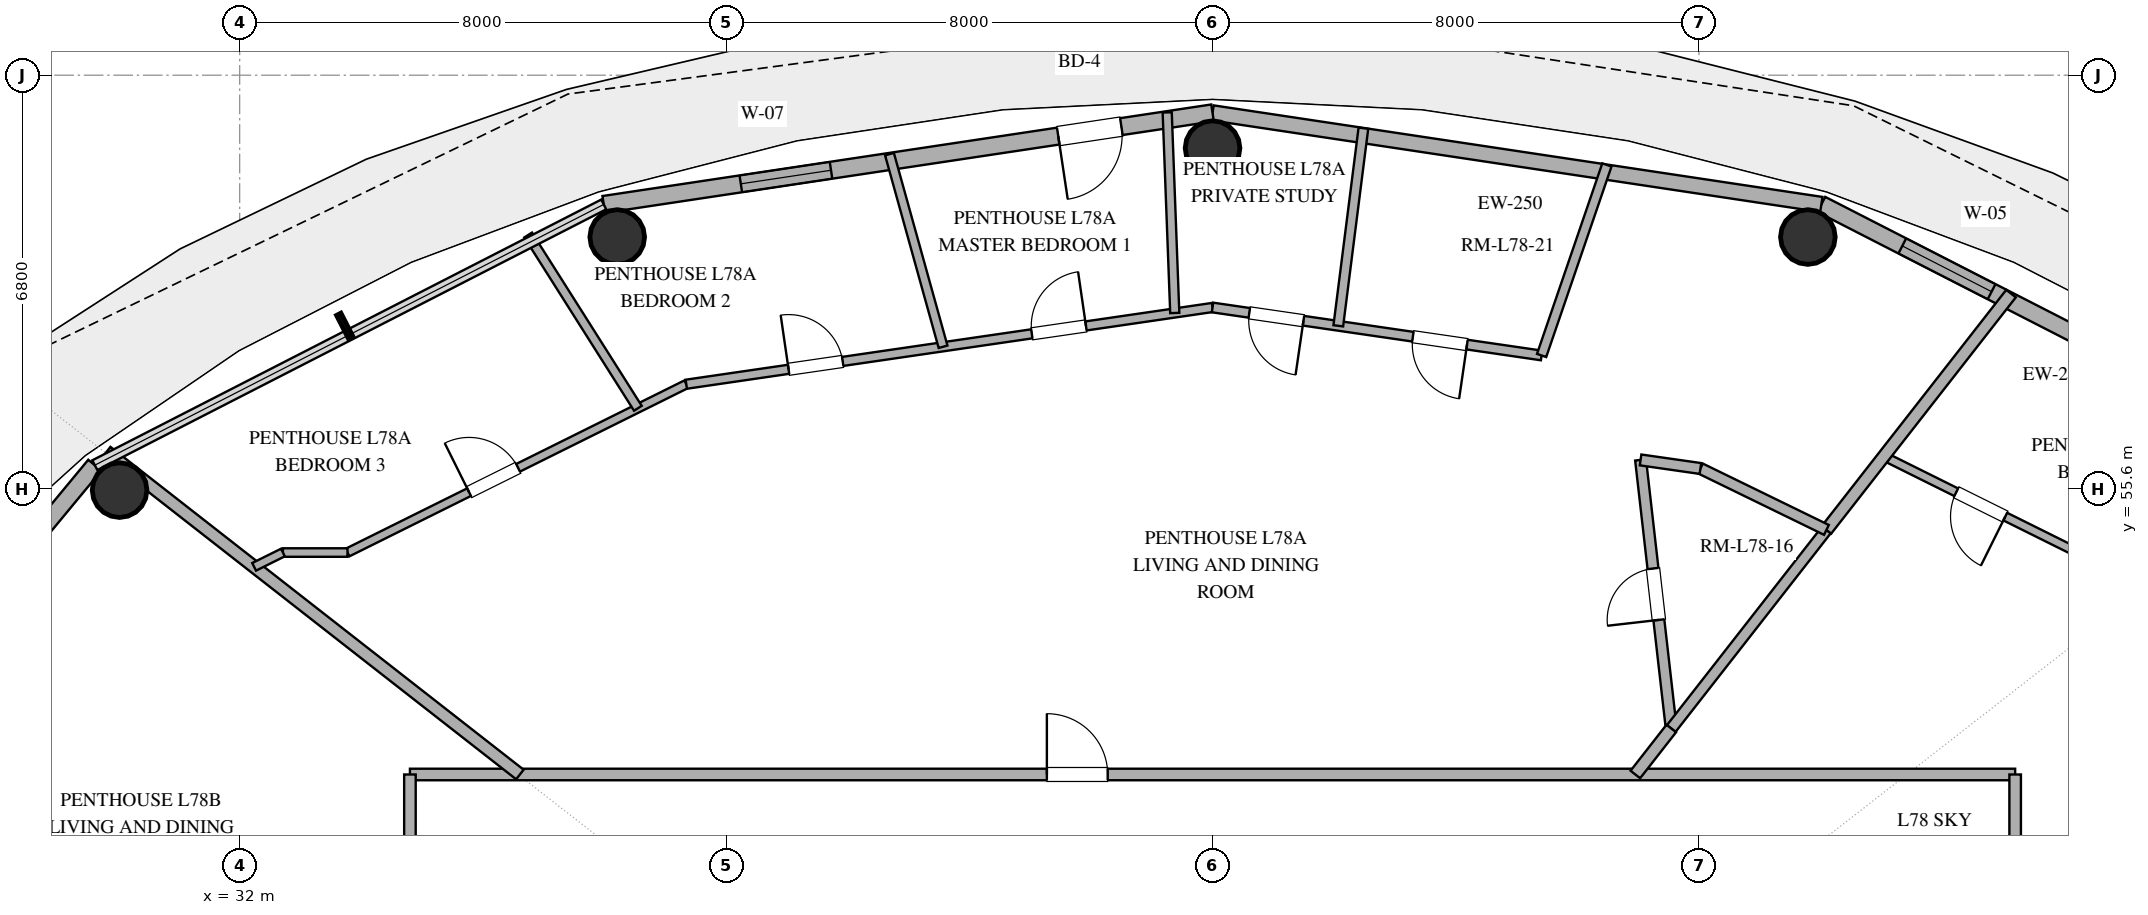
"""IFC4 building model, lengths in metres.
Left out: names, types, materials, properties, quantities, classifications, styles, units other than length and angle.
Written with IfcOpenShell. Run it as: python <this file> out.ifc"""

import sys

from ifc_helpers import new_model, si_unit, direction, frame, frame_2d, origin, origin_2d, place, context, subcontext, project, spatial, rectangle, hollow_circle, extrude, element, fill, save


model = new_model("IFC4")
c1 = context("Model", 3, precision=1e-05, world=origin(), true_north=direction((0.0, 1.0)))
c2 = subcontext(c1, "Body", "Model", "MODEL_VIEW")
j1 = project(units=[si_unit("LENGTHUNIT", "METRE"), si_unit("PLANEANGLEUNIT", "RADIAN")], contexts=[c1])
p1 = place(None, origin())
s1 = spatial("IfcSite", under=j1, at=p1, CompositionType="ELEMENT")
p2 = place(p1, origin())
s2 = spatial("IfcBuilding", under=s1, at=p2, CompositionType="ELEMENT")
p3 = place(p2, frame((0.0, 0.0, 301.8)))
s3 = spatial("IfcBuildingStorey", under=s2, at=p3, CompositionType="ELEMENT", Elevation=301.8)
for number, where, z_axis, x_axis in (
    (1, (57.791, 59.739, 0.0), (0.0, 0.0, 1.0), (1.0, 0.0, 0.0)),
    (2, (48.0, 61.2, 0.0), (0.0, 0.0, 1.0), (1.0, 0.0, 0.0)),
    (3, (38.209, 59.739, 0.0), (0.0, 0.0, 1.0), (1.0, 0.0, 0.0)),
    (4, (30.025, 55.576, 0.0), (0.0, 0.0, 1.0), (1.0, 0.0, 0.0)),
):
    element("IfcColumn", number, at=place(p3, frame(where, z_axis=z_axis, x_axis=x_axis)), inside=s3, PredefinedType="COLUMN", context=c2, shape_type="SweptSolid", body=[
        extrude(hollow_circle(Radius=0.45, WallThickness=0.025, at=origin_2d()), origin(), (0.0, 0.0, 1.0), 3.37),
    ])
p4 = place(p3, frame((66.383, 55.987, 0.0), z_axis=(0.0, 0.0, 1.0), x_axis=(-0.890007394051, 0.455946091699, 0.0)))
e5 = element("IfcWall", 5, at=p4, inside=s3, PredefinedType="SOLIDWALL", context=c2, shape_type="SweptSolid", body=[
    extrude(rectangle(XDim=9.404, YDim=0.28, at=frame_2d((4.702, 0.0))), origin(), (0.0, 0.0, 1.0), 3.37),
])
p5 = place(p4, frame((2.742, 0.0, 0.85)))
e6 = element("IfcOpeningElement", 6, at=p5, cuts=e5, PredefinedType="OPENING", context=c2, shape_type="SweptSolid", body=[
    extrude(rectangle(XDim=1.8, YDim=2.2, at=frame_2d((0.9, 1.1))), frame((0.0, 0.15, 0.0), z_axis=(0.0, -1.0, 0.0), x_axis=(1.0, 0.0, 0.0)), (0.0, 0.0, 1.0), 0.3),
])
p6 = place(p4, frame((6.258, 0.0, 0.85)))
e7 = element("IfcOpeningElement", 7, at=p6, cuts=e5, PredefinedType="OPENING", context=c2, shape_type="SweptSolid", body=[
    extrude(rectangle(XDim=1.65, YDim=2.0, at=frame_2d((0.825, 1.0))), frame((0.0, 0.15, 0.0), z_axis=(0.0, -1.0, 0.0), x_axis=(1.0, 0.0, 0.0)), (0.0, 0.0, 1.0), 0.3),
])
p7 = place(p3, frame((58.013, 60.274, 0.0), z_axis=(0.0, 0.0, 1.0), x_axis=(-0.988882522213, 0.148698881169, 0.0)))
e8 = element("IfcWall", 8, at=p7, inside=s3, PredefinedType="SOLIDWALL", context=c2, shape_type="SweptSolid", body=[
    extrude(rectangle(XDim=10.125, YDim=0.25, at=frame_2d((5.062, 0.0))), origin(), (0.0, 0.0, 1.0), 3.37),
])
p8 = place(p3, frame((48.0, 61.78, 0.0), z_axis=(0.0, 0.0, 1.0), x_axis=(-0.988882522213, -0.148698881169, 0.0)))
e9 = element("IfcWall", 9, at=p8, inside=s3, PredefinedType="SOLIDWALL", context=c2, shape_type="SweptSolid", body=[
    extrude(rectangle(XDim=10.125, YDim=0.28, at=frame_2d((5.062, 0.0))), origin(), (0.0, 0.0, 1.0), 3.37),
])
p9 = place(p8, frame((1.516, 0.0, 0.0)))
e10 = element("IfcOpeningElement", 10, at=p9, cuts=e9, PredefinedType="OPENING", context=c2, shape_type="SweptSolid", body=[
    extrude(rectangle(XDim=1.05, YDim=2.2, at=frame_2d((0.525, 1.1))), frame((0.0, 0.15, 0.0), z_axis=(0.0, -1.0, 0.0), x_axis=(1.0, 0.0, 0.0)), (0.0, 0.0, 1.0), 0.3),
])
p10 = place(p8, frame((6.345, 0.0, 0.85)))
e11 = element("IfcOpeningElement", 11, at=p10, cuts=e9, PredefinedType="OPENING", context=c2, shape_type="SweptSolid", body=[
    extrude(rectangle(XDim=1.5, YDim=1.8, at=frame_2d((0.75, 0.9))), frame((0.0, 0.15, 0.0), z_axis=(0.0, -1.0, 0.0), x_axis=(1.0, 0.0, 0.0)), (0.0, 0.0, 1.0), 0.3),
])
p11 = place(p3, frame((29.617, 55.987, 0.0), z_axis=(0.0, 0.0, 1.0), x_axis=(-0.63761509934, -0.770355103243, 0.0)))
e12 = element("IfcWall", 12, at=p11, inside=s3, PredefinedType="SOLIDWALL", context=c2, shape_type="SweptSolid", body=[
    extrude(rectangle(XDim=8.33, YDim=0.28, at=frame_2d((4.165, 0.0))), origin(), (0.0, 0.0, 1.0), 3.37),
])
p12 = place(p11, frame((2.326, 0.0, 0.85)))
e13 = element("IfcOpeningElement", 13, at=p12, cuts=e12, PredefinedType="OPENING", context=c2, shape_type="SweptSolid", body=[
    extrude(rectangle(XDim=1.35, YDim=1.8, at=frame_2d((0.675, 0.9))), frame((0.0, 0.15, 0.0), z_axis=(0.0, -1.0, 0.0), x_axis=(1.0, 0.0, 0.0)), (0.0, 0.0, 1.0), 0.3),
])
p13 = place(p11, frame((4.546, 0.0, 0.85)))
e14 = element("IfcOpeningElement", 14, at=p13, cuts=e12, PredefinedType="OPENING", context=c2, shape_type="SweptSolid", body=[
    extrude(rectangle(XDim=1.35, YDim=1.8, at=frame_2d((0.675, 0.9))), frame((0.0, 0.15, 0.0), z_axis=(0.0, -1.0, 0.0), x_axis=(1.0, 0.0, 0.0)), (0.0, 0.0, 1.0), 0.3),
])
p14 = place(p3, frame((34.8, 50.9, 0.0), z_axis=(0.0, 0.0, 1.0), x_axis=(1.0, 0.0, 0.0)))
e15 = element("IfcWall", 15, at=p14, inside=s3, PredefinedType="PARTITIONING", context=c2, shape_type="SweptSolid", body=[
    extrude(rectangle(XDim=26.4, YDim=0.19, at=frame_2d((13.2, 0.0))), origin(), (0.0, 0.0, 1.0), 2.73),
])
p15 = place(p14, frame((10.475, 0.0, 0.0)))
e16 = element("IfcOpeningElement", 16, at=p15, cuts=e15, PredefinedType="OPENING", context=c2, shape_type="SweptSolid", body=[
    extrude(rectangle(XDim=1.0, YDim=2.2, at=frame_2d((0.5, 1.1))), frame((0.0, 0.105, 0.0), z_axis=(0.0, -1.0, 0.0), x_axis=(1.0, 0.0, 0.0)), (0.0, 0.0, 1.0), 0.21),
])
p16 = place(p3, frame((61.2, 50.9, 0.0), z_axis=(0.0, 0.0, 1.0), x_axis=(0.0, -1.0, 0.0)))
e17 = element("IfcWall", 17, at=p16, inside=s3, PredefinedType="PARTITIONING", context=c2, shape_type="SweptSolid", body=[
    extrude(rectangle(XDim=16.885, YDim=0.19, at=frame_2d((8.442, 0.0))), origin(), (0.0, 0.0, 1.0), 2.73),
])
p17 = place(p16, frame((7.942, 0.0, 0.0)))
e18 = element("IfcOpeningElement", 18, at=p17, cuts=e17, PredefinedType="OPENING", context=c2, shape_type="SweptSolid", body=[
    extrude(rectangle(XDim=1.0, YDim=2.2, at=frame_2d((0.5, 1.1))), frame((0.0, 0.105, 0.0), z_axis=(0.0, -1.0, 0.0), x_axis=(1.0, 0.0, 0.0)), (0.0, 0.0, 1.0), 0.21),
])
p18 = place(p3, frame((34.8, 37.663, 0.0), z_axis=(0.0, 0.0, 1.0), x_axis=(0.0, 1.0, 0.0)))
e19 = element("IfcWall", 19, at=p18, inside=s3, PredefinedType="PARTITIONING", context=c2, shape_type="SweptSolid", body=[
    extrude(rectangle(XDim=13.237, YDim=0.19, at=frame_2d((6.618, 0.0))), origin(), (0.0, 0.0, 1.0), 2.73),
])
p19 = place(p18, frame((7.46, 0.0, 0.0)))
e20 = element("IfcOpeningElement", 20, at=p19, cuts=e19, PredefinedType="OPENING", context=c2, shape_type="SweptSolid", body=[
    extrude(rectangle(XDim=1.0, YDim=2.2, at=frame_2d((0.5, 1.1))), frame((0.0, 0.105, 0.0), z_axis=(0.0, -1.0, 0.0), x_axis=(1.0, 0.0, 0.0)), (0.0, 0.0, 1.0), 0.21),
])
p20 = place(p3, frame((36.608, 50.9, 0.0), z_axis=(0.0, 0.0, 1.0), x_axis=(-0.78801493083, 0.615656128686, 0.0)))
e21 = element("IfcWall", 21, at=p20, inside=s3, PredefinedType="PARTITIONING", context=c2, shape_type="SweptSolid", body=[
    extrude(rectangle(XDim=8.624, YDim=0.2, at=frame_2d((4.312, 0.0))), origin(), (0.0, 0.0, 1.0), 2.73),
])
p21 = place(p3, frame((33.773, 54.55, 0.0), z_axis=(0.0, 0.0, 1.0), x_axis=(0.895593510097, 0.44487331306, 0.0)))
e22 = element("IfcWall", 22, at=p21, inside=s3, PredefinedType="PARTITIONING", context=c2, shape_type="SweptSolid", body=[
    extrude(rectangle(XDim=6.222, YDim=0.14, at=frame_2d((3.111, 0.0))), origin(), (0.0, 0.0, 1.0), 2.73),
])
p22 = place(p21, frame((2.232, 0.0, 0.0)))
e23 = element("IfcOpeningElement", 23, at=p22, cuts=e22, PredefinedType="OPENING", context=c2, shape_type="SweptSolid", body=[
    extrude(rectangle(XDim=0.9, YDim=2.1, at=frame_2d((0.45, 1.05))), frame((0.0, 0.08, 0.0), z_axis=(0.0, -1.0, 0.0), x_axis=(1.0, 0.0, 0.0)), (0.0, 0.0, 1.0), 0.16),
])
p23 = place(p3, frame((55.544, 51.656, 0.0), z_axis=(0.0, 0.0, 1.0), x_axis=(-0.113517162422, 0.993536035499, 0.0)))
e24 = element("IfcWall", 24, at=p23, inside=s3, PredefinedType="PLUMBINGWALL", context=c2, shape_type="SweptSolid", body=[
    extrude(rectangle(XDim=4.446, YDim=0.18, at=frame_2d((2.223, 0.0))), origin(), (0.0, 0.0, 1.0), 2.73),
])
p24 = place(p23, frame((1.798, 0.0, 0.0)))
e25 = element("IfcOpeningElement", 25, at=p24, cuts=e24, PredefinedType="OPENING", context=c2, shape_type="SweptSolid", body=[
    extrude(rectangle(XDim=0.85, YDim=2.1, at=frame_2d((0.425, 1.05))), frame((0.0, 0.1, 0.0), z_axis=(0.0, -1.0, 0.0), x_axis=(1.0, 0.0, 0.0)), (0.0, 0.0, 1.0), 0.2),
])
p25 = place(p3, frame((39.345, 57.318, 0.0), z_axis=(0.0, 0.0, 1.0), x_axis=(0.989532150642, 0.144312587273, 0.0)))
e26 = element("IfcWall", 26, at=p25, inside=s3, PredefinedType="PARTITIONING", context=c2, shape_type="SweptSolid", body=[
    extrude(rectangle(XDim=8.746, YDim=0.15, at=frame_2d((4.373, 0.0))), origin(), (0.0, 0.0, 1.0), 2.73),
])
p26 = place(p25, frame((1.7, 0.0, 0.0)))
e27 = element("IfcOpeningElement", 27, at=p26, cuts=e26, PredefinedType="OPENING", context=c2, shape_type="SweptSolid", body=[
    extrude(rectangle(XDim=0.9, YDim=2.1, at=frame_2d((0.45, 1.05))), frame((0.0, 0.085, 0.0), z_axis=(0.0, -1.0, 0.0), x_axis=(1.0, 0.0, 0.0)), (0.0, 0.0, 1.0), 0.17),
])
p27 = place(p25, frame((5.743, 0.0, 0.0)))
e28 = element("IfcOpeningElement", 28, at=p27, cuts=e26, PredefinedType="OPENING", context=c2, shape_type="SweptSolid", body=[
    extrude(rectangle(XDim=0.9, YDim=2.1, at=frame_2d((0.45, 1.05))), frame((0.0, 0.085, 0.0), z_axis=(0.0, -1.0, 0.0), x_axis=(1.0, 0.0, 0.0)), (0.0, 0.0, 1.0), 0.17),
])
p28 = place(p3, frame((58.096, 54.922, 0.0), z_axis=(0.0, 0.0, 1.0), x_axis=(-0.615652044057, -0.788018122031, 0.0)))
e29 = element("IfcWall", 29, at=p28, inside=s3, PredefinedType="PLUMBINGWALL", context=c2, shape_type="SweptSolid", body=[
    extrude(rectangle(XDim=4.144, YDim=0.18, at=frame_2d((2.072, 0.0))), origin(), (0.0, 0.0, 1.0), 2.73),
])
p29 = place(p3, frame((62.227, 54.55, 0.0), z_axis=(0.0, 0.0, 1.0), x_axis=(-0.895591084679, 0.444878195739, 0.0)))
e30 = element("IfcWall", 30, at=p29, inside=s3, PredefinedType="PARTITIONING", context=c2, shape_type="SweptSolid", body=[
    extrude(rectangle(XDim=3.557, YDim=0.14, at=frame_2d((1.778, 0.0))), origin(), (0.0, 0.0, 1.0), 2.73),
])
p30 = place(p29, frame((1.328, 0.0, 0.0)))
e31 = element("IfcOpeningElement", 31, at=p30, cuts=e30, PredefinedType="OPENING", context=c2, shape_type="SweptSolid", body=[
    extrude(rectangle(XDim=0.9, YDim=2.1, at=frame_2d((0.45, 1.05))), frame((0.0, 0.08, 0.0), z_axis=(0.0, -1.0, 0.0), x_axis=(1.0, 0.0, 0.0)), (0.0, 0.0, 1.0), 0.16),
])
p31 = place(p3, frame((58.096, 54.922, 0.0), z_axis=(0.0, 0.0, 1.0), x_axis=(0.615676703635, 0.78799885571, 0.0)))
e32 = element("IfcWall", 32, at=p31, inside=s3, PredefinedType="PARTITIONING", context=c2, shape_type="SweptSolid", body=[
    extrude(rectangle(XDim=4.932, YDim=0.2, at=frame_2d((2.466, 0.0))), origin(), (0.0, 0.0, 1.0), 2.73),
])
p32 = place(p3, frame((53.412, 57.791, 0.0), z_axis=(0.0, 0.0, 1.0), x_axis=(-0.989530988967, 0.144320552503, 0.0)))
e33 = element("IfcWall", 33, at=p32, inside=s3, PredefinedType="PLUMBINGWALL", context=c2, shape_type="SweptSolid", body=[
    extrude(rectangle(XDim=5.469, YDim=0.16, at=frame_2d((2.735, 0.0))), origin(), (0.0, 0.0, 1.0), 2.73),
])
p33 = place(p32, frame((1.24, 0.0, 0.0)))
e34 = element("IfcOpeningElement", 34, at=p33, cuts=e33, PredefinedType="OPENING", context=c2, shape_type="SweptSolid", body=[
    extrude(rectangle(XDim=0.9, YDim=2.1, at=frame_2d((0.45, 1.05))), frame((0.0, 0.09, 0.0), z_axis=(0.0, -1.0, 0.0), x_axis=(1.0, 0.0, 0.0)), (0.0, 0.0, 1.0), 0.18),
])
p34 = place(p32, frame((3.958, 0.0, 0.0)))
e35 = element("IfcOpeningElement", 35, at=p34, cuts=e33, PredefinedType="OPENING", context=c2, shape_type="SweptSolid", body=[
    extrude(rectangle(XDim=0.9, YDim=2.1, at=frame_2d((0.45, 1.05))), frame((0.0, 0.09, 0.0), z_axis=(0.0, -1.0, 0.0), x_axis=(1.0, 0.0, 0.0)), (0.0, 0.0, 1.0), 0.18),
])
p35 = place(p3, frame((38.549, 56.922, 0.0), z_axis=(0.0, 0.0, 1.0), x_axis=(-0.535019359821, 0.844839798197, 0.0)))
e36 = element("IfcWall", 36, at=p35, inside=s3, PredefinedType="PARTITIONING", context=c2, shape_type="SweptSolid", body=[
    extrude(rectangle(XDim=3.373, YDim=0.15, at=frame_2d((1.686, 0.0))), origin(), (0.0, 0.0, 1.0), 2.73),
])
p36 = place(p3, frame((54.486, 60.924, 0.0), z_axis=(0.0, 0.0, 1.0), x_axis=(-0.324177330806, -0.945996330961, 0.0)))
e37 = element("IfcWall", 37, at=p36, inside=s3, PredefinedType="PLUMBINGWALL", context=c2, shape_type="SweptSolid", body=[
    extrude(rectangle(XDim=3.312, YDim=0.16, at=frame_2d((1.656, 0.0))), origin(), (0.0, 0.0, 1.0), 2.73),
])
p37 = place(p3, frame((47.379, 58.49, 0.0), z_axis=(0.0, 0.0, 1.0), x_axis=(-0.037643519601, 0.99929123154, 0.0)))
e38 = element("IfcWall", 38, at=p37, inside=s3, PredefinedType="PARTITIONING", context=c2, shape_type="SweptSolid", body=[
    extrude(rectangle(XDim=3.301, YDim=0.15, at=frame_2d((1.651, 0.0))), origin(), (0.0, 0.0, 1.0), 2.73),
])
p38 = place(p3, frame((43.568, 57.934, 0.0), z_axis=(0.0, 0.0, 1.0), x_axis=(-0.267957857452, 0.963430634052, 0.0)))
e39 = element("IfcWall", 39, at=p38, inside=s3, PredefinedType="PARTITIONING", context=c2, shape_type="SweptSolid", body=[
    extrude(rectangle(XDim=3.288, YDim=0.15, at=frame_2d((1.644, 0.0))), origin(), (0.0, 0.0, 1.0), 2.73),
])
p39 = place(p3, frame((50.481, 61.528, 0.0), z_axis=(0.0, 0.0, 1.0), x_axis=(-0.1260156089, -0.992028258828, 0.0)))
e40 = element("IfcWall", 40, at=p39, inside=s3, PredefinedType="PLUMBINGWALL", context=c2, shape_type="SweptSolid", body=[
    extrude(rectangle(XDim=3.276, YDim=0.16, at=frame_2d((1.638, 0.0))), origin(), (0.0, 0.0, 1.0), 2.73),
])
p40 = place(p3, frame((56.024, 55.932, 0.0), z_axis=(0.0, 0.0, 1.0), x_axis=(0.898893612682, -0.438166946585, 0.0)))
e41 = element("IfcWall", 41, at=p40, inside=s3, PredefinedType="PLUMBINGWALL", context=c2, shape_type="SweptSolid", body=[
    extrude(rectangle(XDim=2.305, YDim=0.18, at=frame_2d((1.153, 0.0))), origin(), (0.0, 0.0, 1.0), 2.73),
])
p41 = place(p3, frame((32.711, 54.55, 0.0), z_axis=(0.0, 0.0, 1.0), x_axis=(1.0, 0.0, 0.0)))
e42 = element("IfcWall", 42, at=p41, inside=s3, PredefinedType="PARTITIONING", context=c2, shape_type="SweptSolid", body=[
    extrude(rectangle(XDim=1.062, YDim=0.14, at=frame_2d((0.531, 0.0))), origin(), (0.0, 0.0, 1.0), 2.73),
])
p42 = place(p3, frame((55.04, 56.073, 0.0), z_axis=(0.0, 0.0, 1.0), x_axis=(0.989910163558, -0.141696394039, 0.0)))
e43 = element("IfcWall", 43, at=p42, inside=s3, PredefinedType="PLUMBINGWALL", context=c2, shape_type="SweptSolid", body=[
    extrude(rectangle(XDim=0.994, YDim=0.18, at=frame_2d((0.497, 0.0))), origin(), (0.0, 0.0, 1.0), 2.73),
])
p43 = place(p3, frame((55.544, 51.656, 0.0), z_axis=(0.0, 0.0, 1.0), x_axis=(-0.615752619539, -0.787939535453, 0.0)))
e44 = element("IfcWall", 44, at=p43, inside=s3, PredefinedType="PARTITIONING", context=c2, shape_type="SweptSolid", body=[
    extrude(rectangle(XDim=0.96, YDim=0.2, at=frame_2d((0.48, 0.0))), origin(), (0.0, 0.0, 1.0), 2.73),
])
p44 = place(p3, frame((32.238, 54.315, 0.0), z_axis=(0.0, 0.0, 1.0), x_axis=(0.895257581236, 0.445548945953, 0.0)))
e45 = element("IfcWall", 45, at=p44, inside=s3, PredefinedType="PARTITIONING", context=c2, shape_type="SweptSolid", body=[
    extrude(rectangle(XDim=0.528, YDim=0.14, at=frame_2d((0.264, 0.0))), origin(), (0.0, 0.0, 1.0), 2.73),
])
p45 = place(p6, origin())
e46 = element("IfcWindow", 46, at=p45, inside=s3, PartitioningType="SINGLE_PANEL", PredefinedType="WINDOW", context=c2, shape_type="SweptSolid", body=[
    extrude(rectangle(XDim=1.65, YDim=2.0, at=frame_2d((0.825, 1.0))), frame((0.0, 0.03, 0.0), z_axis=(0.0, -1.0, 0.0), x_axis=(1.0, 0.0, 0.0)), (0.0, 0.0, 1.0), 0.06),
])
fill(e7, e46)
p46 = place(p9, origin())
e47 = element("IfcDoor", 47, at=p46, inside=s3, OperationType="SINGLE_SWING_RIGHT", PredefinedType="DOOR", context=c2, shape_type="SweptSolid", body=[
    extrude(rectangle(XDim=1.05, YDim=2.2, at=frame_2d((0.525, 1.1))), frame((0.0, 0.025, 0.0), z_axis=(0.0, -1.0, 0.0), x_axis=(1.0, 0.0, 0.0)), (0.0, 0.0, 1.0), 0.05),
])
fill(e10, e47)
p47 = place(p10, origin())
e48 = element("IfcWindow", 48, at=p47, inside=s3, PartitioningType="SINGLE_PANEL", PredefinedType="WINDOW", context=c2, shape_type="SweptSolid", body=[
    extrude(rectangle(XDim=1.5, YDim=1.8, at=frame_2d((0.75, 0.9))), frame((0.0, 0.03, 0.0), z_axis=(0.0, -1.0, 0.0), x_axis=(1.0, 0.0, 0.0)), (0.0, 0.0, 1.0), 0.06),
])
fill(e11, e48)
p48 = place(p15, origin())
e49 = element("IfcDoor", 49, at=p48, inside=s3, OperationType="SINGLE_SWING_LEFT", PredefinedType="DOOR", context=c2, shape_type="SweptSolid", body=[
    extrude(rectangle(XDim=1.0, YDim=2.2, at=frame_2d((0.5, 1.1))), frame((0.0, 0.025, 0.0), z_axis=(0.0, -1.0, 0.0), x_axis=(1.0, 0.0, 0.0)), (0.0, 0.0, 1.0), 0.05),
])
fill(e16, e49)
p49 = place(p22, origin())
e50 = element("IfcDoor", 50, at=p49, inside=s3, OperationType="SINGLE_SWING_LEFT", PredefinedType="DOOR", context=c2, shape_type="SweptSolid", body=[
    extrude(rectangle(XDim=0.9, YDim=2.1, at=frame_2d((0.45, 1.05))), frame((0.0, 0.025, 0.0), z_axis=(0.0, -1.0, 0.0), x_axis=(1.0, 0.0, 0.0)), (0.0, 0.0, 1.0), 0.05),
])
fill(e23, e50)
p50 = place(p24, origin())
e51 = element("IfcDoor", 51, at=p50, inside=s3, OperationType="SINGLE_SWING_LEFT", PredefinedType="DOOR", context=c2, shape_type="SweptSolid", body=[
    extrude(rectangle(XDim=0.85, YDim=2.1, at=frame_2d((0.425, 1.05))), frame((0.0, 0.025, 0.0), z_axis=(0.0, -1.0, 0.0), x_axis=(1.0, 0.0, 0.0)), (0.0, 0.0, 1.0), 0.05),
])
fill(e25, e51)
p51 = place(p26, origin())
e52 = element("IfcDoor", 52, at=p51, inside=s3, OperationType="SINGLE_SWING_LEFT", PredefinedType="DOOR", context=c2, shape_type="SweptSolid", body=[
    extrude(rectangle(XDim=0.9, YDim=2.1, at=frame_2d((0.45, 1.05))), frame((0.0, 0.025, 0.0), z_axis=(0.0, -1.0, 0.0), x_axis=(1.0, 0.0, 0.0)), (0.0, 0.0, 1.0), 0.05),
])
fill(e27, e52)
p52 = place(p27, origin())
e53 = element("IfcDoor", 53, at=p52, inside=s3, OperationType="SINGLE_SWING_RIGHT", PredefinedType="DOOR", context=c2, shape_type="SweptSolid", body=[
    extrude(rectangle(XDim=0.9, YDim=2.1, at=frame_2d((0.45, 1.05))), frame((0.0, 0.025, 0.0), z_axis=(0.0, -1.0, 0.0), x_axis=(1.0, 0.0, 0.0)), (0.0, 0.0, 1.0), 0.05),
])
fill(e28, e53)
p53 = place(p30, origin())
e54 = element("IfcDoor", 54, at=p53, inside=s3, OperationType="SINGLE_SWING_LEFT", PredefinedType="DOOR", context=c2, shape_type="SweptSolid", body=[
    extrude(rectangle(XDim=0.9, YDim=2.1, at=frame_2d((0.45, 1.05))), frame((0.0, 0.025, 0.0), z_axis=(0.0, -1.0, 0.0), x_axis=(1.0, 0.0, 0.0)), (0.0, 0.0, 1.0), 0.05),
])
fill(e31, e54)
p54 = place(p33, origin())
e55 = element("IfcDoor", 55, at=p54, inside=s3, OperationType="SINGLE_SWING_LEFT", PredefinedType="DOOR", context=c2, shape_type="SweptSolid", body=[
    extrude(rectangle(XDim=0.9, YDim=2.1, at=frame_2d((0.45, 1.05))), frame((0.0, 0.025, 0.0), z_axis=(0.0, -1.0, 0.0), x_axis=(1.0, 0.0, 0.0)), (0.0, 0.0, 1.0), 0.05),
])
fill(e34, e55)
p55 = place(p34, origin())
e56 = element("IfcDoor", 56, at=p55, inside=s3, OperationType="SINGLE_SWING_LEFT", PredefinedType="DOOR", context=c2, shape_type="SweptSolid", body=[
    extrude(rectangle(XDim=0.9, YDim=2.1, at=frame_2d((0.45, 1.05))), frame((0.0, 0.025, 0.0), z_axis=(0.0, -1.0, 0.0), x_axis=(1.0, 0.0, 0.0)), (0.0, 0.0, 1.0), 0.05),
])
fill(e35, e56)
save(model, sys.argv[1])
